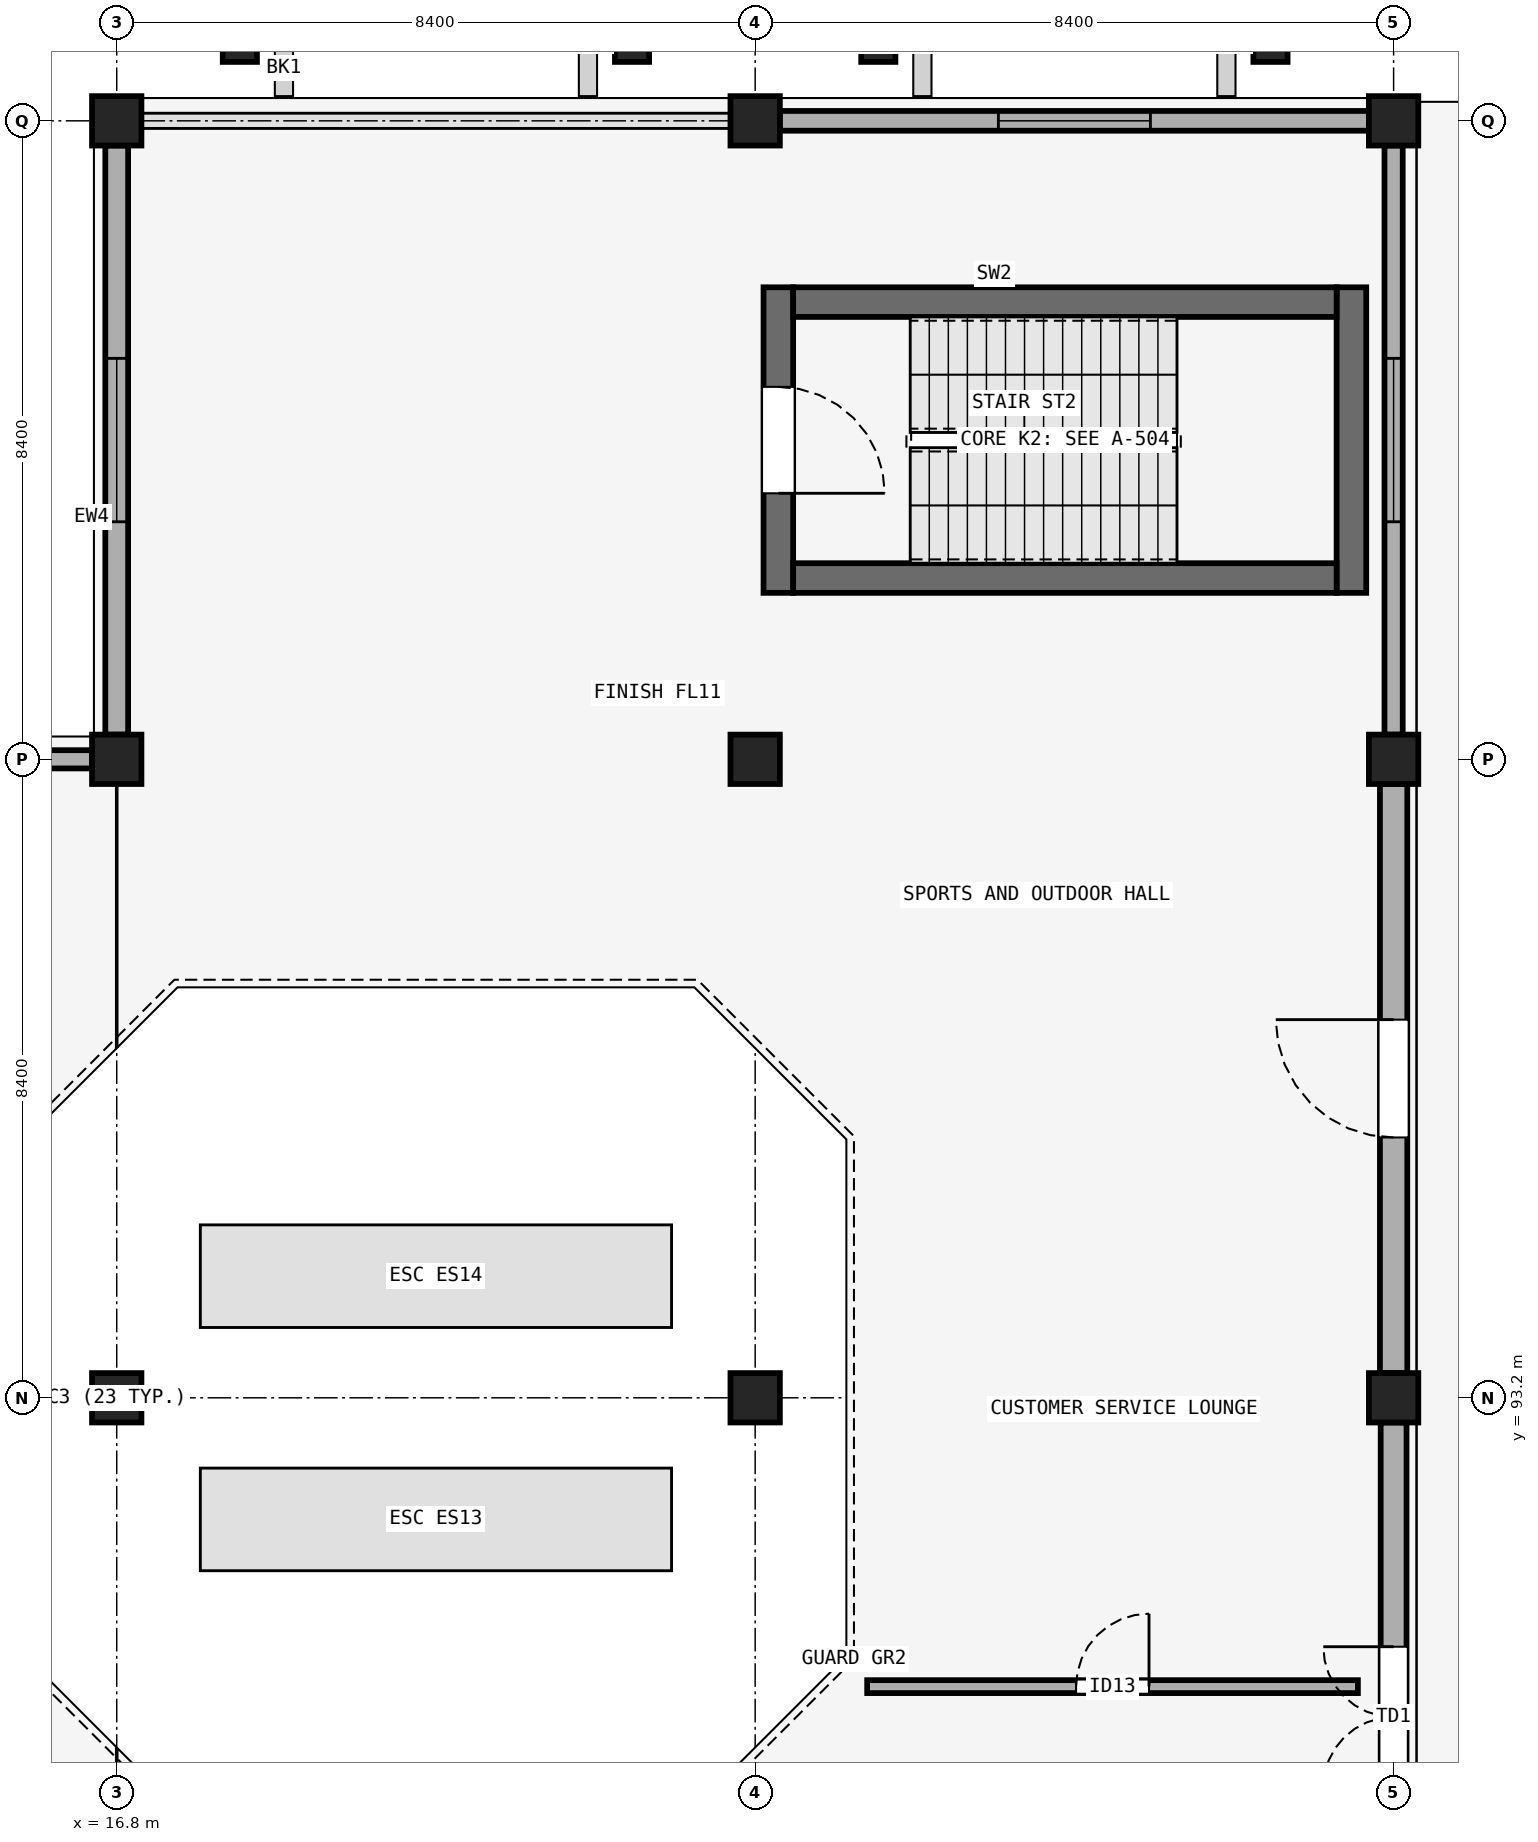
"""IFC4 building model, lengths in metres.
Left out: names, types, materials, properties, quantities, classifications, styles, units other than length and angle.
Written with IfcOpenShell. Run it as: python <this file> out.ifc"""

import sys

from ifc_helpers import new_model, si_unit, direction, frame, frame_2d, origin, origin_2d, place, context, subcontext, project, spatial, rectangle, extrude, element, fill, save


model = new_model("IFC4")
c1 = context("Model", 3, precision=1e-05, world=origin(), true_north=direction((0.0, 1.0)))
c2 = subcontext(c1, "Body", "Model", "MODEL_VIEW")
j1 = project(units=[si_unit("LENGTHUNIT", "METRE"), si_unit("PLANEANGLEUNIT", "RADIAN")], contexts=[c1])
p1 = place(None, origin())
s1 = spatial("IfcSite", under=j1, at=p1, CompositionType="ELEMENT")
p2 = place(p1, origin())
s2 = spatial("IfcBuilding", under=s1, at=p2, CompositionType="ELEMENT")
p3 = place(p2, frame((0.0, 0.0, 27.9)))
s3 = spatial("IfcBuildingStorey", under=s2, at=p3, CompositionType="ELEMENT", Elevation=27.9)
for number, where, z_axis, x_axis in (
    (1, (16.8, 93.2, 0.0), (0.0, 0.0, 1.0), (1.0, 0.0, 0.0)),
    (2, (25.2, 93.2, 0.0), (0.0, 0.0, 1.0), (1.0, 0.0, 0.0)),
    (3, (33.6, 93.2, 0.0), (0.0, 0.0, 1.0), (1.0, 0.0, 0.0)),
    (4, (16.8, 101.6, 0.0), (0.0, 0.0, 1.0), (1.0, 0.0, 0.0)),
    (5, (25.2, 101.6, 0.0), (0.0, 0.0, 1.0), (1.0, 0.0, 0.0)),
    (6, (33.6, 101.6, 0.0), (0.0, 0.0, 1.0), (1.0, 0.0, 0.0)),
    (7, (16.8, 110.0, 0.0), (0.0, 0.0, 1.0), (1.0, 0.0, 0.0)),
    (8, (25.2, 110.0, 0.0), (0.0, 0.0, 1.0), (1.0, 0.0, 0.0)),
    (9, (33.6, 110.0, 0.0), (0.0, 0.0, 1.0), (1.0, 0.0, 0.0)),
):
    element("IfcColumn", number, at=place(p3, frame(where, z_axis=z_axis, x_axis=x_axis)), inside=s3, PredefinedType="COLUMN", context=c2, shape_type="SweptSolid", body=[
        extrude(rectangle(XDim=0.65, YDim=0.65, at=origin_2d()), origin(), (0.0, 0.0, 1.0), 4.5),
    ])
for number, where, z_axis, x_axis in (
    (10, (18.42, 111.05, 0.0), (0.0, 0.0, 1.0), (1.0, 0.0, 0.0)),
    (11, (23.58, 111.05, 0.0), (0.0, 0.0, 1.0), (1.0, 0.0, 0.0)),
    (12, (26.82, 111.05, 0.0), (0.0, 0.0, 1.0), (1.0, 0.0, 0.0)),
    (13, (31.98, 111.05, 0.0), (0.0, 0.0, 1.0), (1.0, 0.0, 0.0)),
):
    element("IfcColumn", number, at=place(p3, frame(where, z_axis=z_axis, x_axis=x_axis)), inside=s3, PredefinedType="PILASTER", context=c2, shape_type="SweptSolid", body=[
        extrude(rectangle(XDim=0.45, YDim=0.55, at=origin_2d()), origin(), (0.0, 0.0, 1.0), 4.5),
    ])
p4 = place(p3, frame((8.725, 101.6, 0.0), z_axis=(0.0, 0.0, 1.0), x_axis=(1.0, 0.0, 0.0)))
e14 = element("IfcWall", 14, at=p4, inside=s3, PredefinedType="SOLIDWALL", context=c2, shape_type="SweptSolid", body=[
    extrude(rectangle(XDim=7.75, YDim=0.24, at=frame_2d((3.875, 0.0))), origin(), (0.0, 0.0, 1.0), 3.45),
])
p5 = place(p4, frame((2.875, 0.0, 0.95)))
e15 = element("IfcOpeningElement", 15, at=p5, cuts=e14, PredefinedType="OPENING", context=c2, shape_type="SweptSolid", body=[
    extrude(rectangle(XDim=2.0, YDim=1.85, at=frame_2d((1.0, 0.925))), frame((0.0, 0.13, 0.0), z_axis=(0.0, -1.0, 0.0), x_axis=(1.0, 0.0, 0.0)), (0.0, 0.0, 1.0), 0.26),
])
p6 = place(p3, frame((25.525, 110.0, 0.0), z_axis=(0.0, 0.0, 1.0), x_axis=(1.0, 0.0, 0.0)))
e16 = element("IfcWall", 16, at=p6, inside=s3, PredefinedType="SOLIDWALL", context=c2, shape_type="SweptSolid", body=[
    extrude(rectangle(XDim=7.75, YDim=0.26, at=frame_2d((3.875, 0.0))), origin(), (0.0, 0.0, 1.0), 3.45),
])
p7 = place(p6, frame((2.875, 0.0, 0.95)))
e17 = element("IfcOpeningElement", 17, at=p7, cuts=e16, PredefinedType="OPENING", context=c2, shape_type="SweptSolid", body=[
    extrude(rectangle(XDim=2.0, YDim=2.1, at=frame_2d((1.0, 1.05))), frame((0.0, 0.14, 0.0), z_axis=(0.0, -1.0, 0.0), x_axis=(1.0, 0.0, 0.0)), (0.0, 0.0, 1.0), 0.28),
])
p8 = place(p3, frame((16.8, 101.925, 0.0), z_axis=(0.0, 0.0, 1.0), x_axis=(0.0, 1.0, 0.0)))
e18 = element("IfcWall", 18, at=p8, inside=s3, PredefinedType="SOLIDWALL", context=c2, shape_type="SweptSolid", body=[
    extrude(rectangle(XDim=7.75, YDim=0.3, at=frame_2d((3.875, 0.0))), origin(), (0.0, 0.0, 1.0), 3.45),
])
p9 = place(p8, frame((2.8, 0.0, 0.95)))
e19 = element("IfcOpeningElement", 19, at=p9, cuts=e18, PredefinedType="OPENING", context=c2, shape_type="SweptSolid", body=[
    extrude(rectangle(XDim=2.15, YDim=1.6, at=frame_2d((1.075, 0.8))), frame((0.0, 0.16, 0.0), z_axis=(0.0, -1.0, 0.0), x_axis=(1.0, 0.0, 0.0)), (0.0, 0.0, 1.0), 0.32),
])
p10 = place(p3, frame((33.6, 85.125, 0.0), z_axis=(0.0, 0.0, 1.0), x_axis=(0.0, 1.0, 0.0)))
e20 = element("IfcWall", 20, at=p10, inside=s3, PredefinedType="SOLIDWALL", context=c2, shape_type="SweptSolid", body=[
    extrude(rectangle(XDim=7.75, YDim=0.34, at=frame_2d((3.875, 0.0))), origin(), (0.0, 0.0, 1.0), 3.45),
])
p11 = place(p10, frame((2.95, 0.0, 0.0)))
e21 = element("IfcOpeningElement", 21, at=p11, cuts=e20, PredefinedType="OPENING", context=c2, shape_type="SweptSolid", body=[
    extrude(rectangle(XDim=1.85, YDim=2.3, at=frame_2d((0.925, 1.15))), frame((0.0, 0.18, 0.0), z_axis=(0.0, -1.0, 0.0), x_axis=(1.0, 0.0, 0.0)), (0.0, 0.0, 1.0), 0.36),
])
p12 = place(p3, frame((33.6, 93.525, 0.0), z_axis=(0.0, 0.0, 1.0), x_axis=(0.0, 1.0, 0.0)))
e22 = element("IfcWall", 22, at=p12, inside=s3, PredefinedType="SOLIDWALL", context=c2, shape_type="SweptSolid", body=[
    extrude(rectangle(XDim=7.75, YDim=0.36, at=frame_2d((3.875, 0.0))), origin(), (0.0, 0.0, 1.0), 3.45),
])
p13 = place(p12, frame((3.1, 0.0, 0.0)))
e23 = element("IfcOpeningElement", 23, at=p13, cuts=e22, PredefinedType="OPENING", context=c2, shape_type="SweptSolid", body=[
    extrude(rectangle(XDim=1.55, YDim=2.25, at=frame_2d((0.775, 1.125))), frame((0.0, 0.19, 0.0), z_axis=(0.0, -1.0, 0.0), x_axis=(1.0, 0.0, 0.0)), (0.0, 0.0, 1.0), 0.38),
])
p14 = place(p3, frame((33.6, 101.925, 0.0), z_axis=(0.0, 0.0, 1.0), x_axis=(0.0, 1.0, 0.0)))
e24 = element("IfcWall", 24, at=p14, inside=s3, PredefinedType="SOLIDWALL", context=c2, shape_type="SweptSolid", body=[
    extrude(rectangle(XDim=7.75, YDim=0.24, at=frame_2d((3.875, 0.0))), origin(), (0.0, 0.0, 1.0), 3.45),
])
p15 = place(p14, frame((2.8, 0.0, 0.95)))
e25 = element("IfcOpeningElement", 25, at=p15, cuts=e24, PredefinedType="OPENING", context=c2, shape_type="SweptSolid", body=[
    extrude(rectangle(XDim=2.15, YDim=2.1, at=frame_2d((1.075, 1.05))), frame((0.0, 0.13, 0.0), z_axis=(0.0, -1.0, 0.0), x_axis=(1.0, 0.0, 0.0)), (0.0, 0.0, 1.0), 0.26),
])
p16 = place(p3, frame((25.505, 107.81, 0.0), z_axis=(0.0, 0.0, 1.0), x_axis=(0.0, -1.0, 0.0)))
e26 = element("IfcWall", 26, at=p16, inside=s3, PredefinedType="SHEAR", context=c2, shape_type="SweptSolid", body=[
    extrude(rectangle(XDim=4.02, YDim=0.39, at=frame_2d((2.01, 0.0))), origin(), (0.0, 0.0, 1.0), 4.2),
])
p17 = place(p16, frame((1.31, 0.0, 0.0)))
e27 = element("IfcOpeningElement", 27, at=p17, cuts=e26, PredefinedType="OPENING", context=c2, shape_type="SweptSolid", body=[
    extrude(rectangle(XDim=1.4, YDim=2.15, at=frame_2d((0.7, 1.075))), frame((0.0, 0.205, 0.0), z_axis=(0.0, -1.0, 0.0), x_axis=(1.0, 0.0, 0.0)), (0.0, 0.0, 1.0), 0.41),
])
p18 = place(p3, frame((33.045, 103.79, 0.0), z_axis=(0.0, 0.0, 1.0), x_axis=(0.0, 1.0, 0.0)))
e28 = element("IfcWall", 28, at=p18, inside=s3, PredefinedType="SHEAR", context=c2, shape_type="SweptSolid", body=[
    extrude(rectangle(XDim=4.02, YDim=0.39, at=frame_2d((2.01, 0.0))), origin(), (0.0, 0.0, 1.0), 4.2),
])
for number, where, z_axis, x_axis in (
    (29, (25.7, 103.985, 0.0), (0.0, 0.0, 1.0), (1.0, 0.0, 0.0)),
    (30, (25.7, 107.615, 0.0), (0.0, 0.0, 1.0), (1.0, 0.0, 0.0)),
):
    element("IfcWall", number, at=place(p3, frame(where, z_axis=z_axis, x_axis=x_axis)), inside=s3, PredefinedType="SHEAR", context=c2, shape_type="SweptSolid", body=[
        extrude(rectangle(XDim=7.15, YDim=0.39, at=frame_2d((3.575, 0.0))), origin(), (0.0, 0.0, 1.0), 4.2),
    ])
p19 = place(p3, frame((26.674, 89.4, 0.0), z_axis=(0.0, 0.0, 1.0), x_axis=(1.0, 0.0, 0.0)))
e31 = element("IfcWall", 31, at=p19, inside=s3, PredefinedType="PARTITIONING", context=c2, shape_type="SweptSolid", body=[
    extrude(rectangle(XDim=6.456, YDim=0.17, at=frame_2d((3.228, 0.0))), origin(), (0.0, 0.0, 1.0), 4.2),
])
p20 = place(p19, frame((2.748, 0.0, 0.0)))
e32 = element("IfcOpeningElement", 32, at=p20, cuts=e31, PredefinedType="OPENING", context=c2, shape_type="SweptSolid", body=[
    extrude(rectangle(XDim=0.96, YDim=2.34, at=frame_2d((0.48, 1.17))), frame((0.0, 0.095, 0.0), z_axis=(0.0, -1.0, 0.0), x_axis=(1.0, 0.0, 0.0)), (0.0, 0.0, 1.0), 0.19),
])
p21 = place(p7, origin())
e33 = element("IfcWindow", 33, at=p21, inside=s3, PartitioningType="DOUBLE_PANEL_VERTICAL", PredefinedType="WINDOW", context=c2, shape_type="SweptSolid", body=[
    extrude(rectangle(XDim=2.0, YDim=2.1, at=frame_2d((1.0, 1.05))), frame((0.0, 0.03, 0.0), z_axis=(0.0, -1.0, 0.0), x_axis=(1.0, 0.0, 0.0)), (0.0, 0.0, 1.0), 0.06),
])
fill(e17, e33)
p22 = place(p9, origin())
e34 = element("IfcWindow", 34, at=p22, inside=s3, PartitioningType="DOUBLE_PANEL_VERTICAL", PredefinedType="WINDOW", context=c2, shape_type="SweptSolid", body=[
    extrude(rectangle(XDim=2.15, YDim=1.6, at=frame_2d((1.075, 0.8))), frame((0.0, 0.03, 0.0), z_axis=(0.0, -1.0, 0.0), x_axis=(1.0, 0.0, 0.0)), (0.0, 0.0, 1.0), 0.06),
])
fill(e19, e34)
p23 = place(p11, origin())
e35 = element("IfcDoor", 35, at=p23, inside=s3, OperationType="DOUBLE_DOOR_SINGLE_SWING", PredefinedType="DOOR", context=c2, shape_type="SweptSolid", body=[
    extrude(rectangle(XDim=1.85, YDim=2.3, at=frame_2d((0.925, 1.15))), frame((0.0, 0.025, 0.0), z_axis=(0.0, -1.0, 0.0), x_axis=(1.0, 0.0, 0.0)), (0.0, 0.0, 1.0), 0.05),
])
fill(e21, e35)
p24 = place(p13, origin())
e36 = element("IfcDoor", 36, at=p24, inside=s3, OperationType="SINGLE_SWING_RIGHT", PredefinedType="DOOR", context=c2, shape_type="SweptSolid", body=[
    extrude(rectangle(XDim=1.55, YDim=2.25, at=frame_2d((0.775, 1.125))), frame((0.0, 0.025, 0.0), z_axis=(0.0, -1.0, 0.0), x_axis=(1.0, 0.0, 0.0)), (0.0, 0.0, 1.0), 0.05),
])
fill(e23, e36)
p25 = place(p15, origin())
e37 = element("IfcWindow", 37, at=p25, inside=s3, PartitioningType="DOUBLE_PANEL_VERTICAL", PredefinedType="WINDOW", context=c2, shape_type="SweptSolid", body=[
    extrude(rectangle(XDim=2.15, YDim=2.1, at=frame_2d((1.075, 1.05))), frame((0.0, 0.03, 0.0), z_axis=(0.0, -1.0, 0.0), x_axis=(1.0, 0.0, 0.0)), (0.0, 0.0, 1.0), 0.06),
])
fill(e25, e37)
p26 = place(p17, origin())
e38 = element("IfcDoor", 38, at=p26, inside=s3, OperationType="SINGLE_SWING_RIGHT", PredefinedType="DOOR", context=c2, shape_type="SweptSolid", body=[
    extrude(rectangle(XDim=1.4, YDim=2.15, at=frame_2d((0.7, 1.075))), frame((0.0, 0.025, 0.0), z_axis=(0.0, -1.0, 0.0), x_axis=(1.0, 0.0, 0.0)), (0.0, 0.0, 1.0), 0.05),
])
fill(e27, e38)
p27 = place(p20, origin())
e39 = element("IfcDoor", 39, at=p27, inside=s3, OperationType="SINGLE_SWING_RIGHT", PredefinedType="DOOR", context=c2, shape_type="SweptSolid", body=[
    extrude(rectangle(XDim=0.96, YDim=2.34, at=frame_2d((0.48, 1.17))), frame((0.0, 0.025, 0.0), z_axis=(0.0, -1.0, 0.0), x_axis=(1.0, 0.0, 0.0)), (0.0, 0.0, 1.0), 0.05),
])
fill(e32, e39)
save(model, sys.argv[1])
